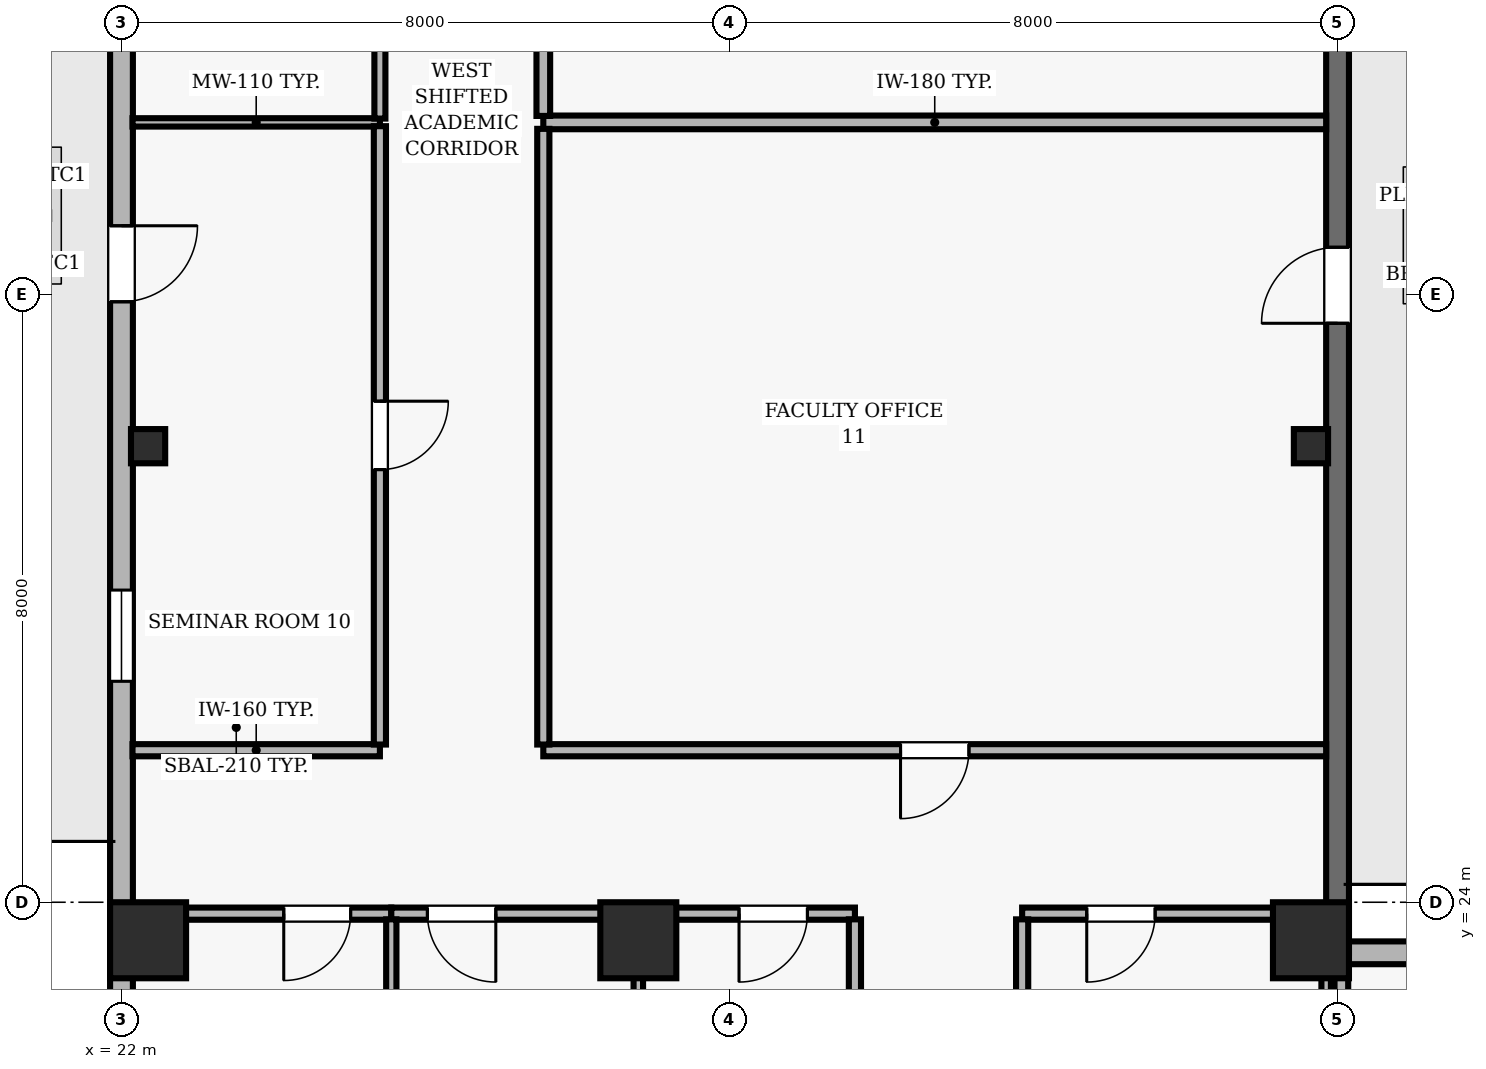
"""IFC4 building model, lengths in metres.
Left out: names, types, materials, properties, quantities, classifications, styles, units other than length and angle.
Written with IfcOpenShell. Run it as: python <this file> out.ifc"""

import sys

from ifc_helpers import new_model, si_unit, direction, frame, frame_2d, origin, origin_2d, place, context, subcontext, project, spatial, rectangle, hollow_rectangle, extrude, element, fill, save


model = new_model("IFC4")
c1 = context("Model", 3, precision=1e-05, world=origin(), true_north=direction((0.0, 1.0)))
c2 = subcontext(c1, "Body", "Model", "MODEL_VIEW")
j1 = project(units=[si_unit("LENGTHUNIT", "METRE"), si_unit("PLANEANGLEUNIT", "RADIAN")], contexts=[c1])
p1 = place(None, origin())
s1 = spatial("IfcSite", under=j1, at=p1, CompositionType="ELEMENT")
p2 = place(p1, origin())
s2 = spatial("IfcBuilding", under=s1, at=p2, CompositionType="ELEMENT")
p3 = place(p2, frame((0.0, 0.0, 199.2)))
s3 = spatial("IfcBuildingStorey", under=s2, at=p3, CompositionType="ELEMENT", Elevation=199.2)
for number, where, z_axis, x_axis in (
    (1, (22.35, 23.5, 0.0), (0.0, 0.0, 1.0), (1.0, 0.0, 0.0)),
    (2, (28.8, 23.5, 0.0), (0.0, 0.0, 1.0), (1.0, 0.0, 0.0)),
    (3, (37.65, 23.5, 0.0), (0.0, 0.0, 1.0), (1.0, 0.0, 0.0)),
):
    element("IfcColumn", number, at=place(p3, frame(where, z_axis=z_axis, x_axis=x_axis)), inside=s3, PredefinedType="COLUMN", context=c2, shape_type="SweptSolid", body=[
        extrude(rectangle(XDim=1.0, YDim=1.0, at=origin_2d()), origin(), (0.0, 0.0, 1.0), 3.9),
    ])
for number, where, z_axis, x_axis in (
    (4, (22.35, 30.0, 0.0), (0.0, 0.0, 1.0), (1.0, 0.0, 0.0)),
    (5, (37.65, 30.0, 0.0), (0.0, 0.0, 1.0), (1.0, 0.0, 0.0)),
):
    element("IfcColumn", number, at=place(p3, frame(where, z_axis=z_axis, x_axis=x_axis)), inside=s3, PredefinedType="COLUMN", context=c2, shape_type="SweptSolid", body=[
        extrude(hollow_rectangle(XDim=0.45, YDim=0.45, WallThickness=0.02, at=origin_2d()), origin(), (0.0, 0.0, 1.0), 3.9),
    ])
p4 = place(p3, frame((45.9, 23.335, 0.0), z_axis=(0.0, 0.0, 1.0), x_axis=(-1.0, 0.0, 0.0)))
e6 = element("IfcWall", 6, at=p4, inside=s3, PredefinedType="SOLIDWALL", context=c2, shape_type="SweptSolid", body=[
    extrude(rectangle(XDim=7.9, YDim=0.3, at=frame_2d((3.95, 0.0))), origin(), (0.0, 0.0, 1.0), 3.69),
])
p5 = place(p4, frame((2.75, 0.0, 0.9)))
e7 = element("IfcOpeningElement", 7, at=p5, cuts=e6, PredefinedType="OPENING", context=c2, shape_type="SweptSolid", body=[
    extrude(rectangle(XDim=2.4, YDim=1.8, at=frame_2d((1.2, 0.9))), frame((0.0, 0.16, 0.0), z_axis=(0.0, -1.0, 0.0), x_axis=(1.0, 0.0, 0.0)), (0.0, 0.0, 1.0), 0.32),
])
p6 = place(p3, frame((38.0, 23.335, 0.0), z_axis=(0.0, 0.0, 1.0), x_axis=(0.0, 1.0, 0.0)))
e8 = element("IfcWall", 8, at=p6, inside=s3, PredefinedType="SOLIDWALL", context=c2, shape_type="SweptSolid", body=[
    extrude(rectangle(XDim=17.365, YDim=0.3, at=frame_2d((8.683, 0.0))), origin(), (0.0, 0.0, 1.0), 3.69),
])
p7 = place(p6, frame((8.282, 0.0, 0.0)))
e9 = element("IfcOpeningElement", 9, at=p7, cuts=e8, PredefinedType="OPENING", context=c2, shape_type="SweptSolid", body=[
    extrude(rectangle(XDim=1.0, YDim=2.2, at=frame_2d((0.5, 1.1))), frame((0.0, 0.16, 0.0), z_axis=(0.0, -1.0, 0.0), x_axis=(1.0, 0.0, 0.0)), (0.0, 0.0, 1.0), 0.32),
])
p8 = place(p6, frame((13.071, 0.0, 0.9)))
e10 = element("IfcOpeningElement", 10, at=p8, cuts=e8, PredefinedType="OPENING", context=c2, shape_type="SweptSolid", body=[
    extrude(rectangle(XDim=2.8, YDim=1.8, at=frame_2d((1.4, 0.9))), frame((0.0, 0.16, 0.0), z_axis=(0.0, -1.0, 0.0), x_axis=(1.0, 0.0, 0.0)), (0.0, 0.0, 1.0), 0.32),
])
p9 = place(p3, frame((22.0, 40.7, 0.0), z_axis=(0.0, 0.0, 1.0), x_axis=(0.0, -1.0, 0.0)))
e11 = element("IfcWall", 11, at=p9, inside=s3, PredefinedType="SOLIDWALL", context=c2, shape_type="SweptSolid", body=[
    extrude(rectangle(XDim=38.2, YDim=0.3, at=frame_2d((19.1, 0.0))), origin(), (0.0, 0.0, 1.0), 3.69),
])
p10 = place(p9, frame((7.8, 0.0, 0.0)))
e12 = element("IfcOpeningElement", 12, at=p10, cuts=e11, PredefinedType="OPENING", context=c2, shape_type="SweptSolid", body=[
    extrude(rectangle(XDim=1.0, YDim=2.2, at=frame_2d((0.5, 1.1))), frame((0.0, 0.16, 0.0), z_axis=(0.0, -1.0, 0.0), x_axis=(1.0, 0.0, 0.0)), (0.0, 0.0, 1.0), 0.32),
])
p11 = place(p9, frame((2.129, 0.0, 0.9)))
e13 = element("IfcOpeningElement", 13, at=p11, cuts=e11, PredefinedType="OPENING", context=c2, shape_type="SweptSolid", body=[
    extrude(rectangle(XDim=1.2, YDim=1.6, at=frame_2d((0.6, 0.8))), frame((0.0, 0.16, 0.0), z_axis=(0.0, -1.0, 0.0), x_axis=(1.0, 0.0, 0.0)), (0.0, 0.0, 1.0), 0.32),
])
p12 = place(p9, frame((12.593, 0.0, 0.9)))
e14 = element("IfcOpeningElement", 14, at=p12, cuts=e11, PredefinedType="OPENING", context=c2, shape_type="SweptSolid", body=[
    extrude(rectangle(XDim=1.2, YDim=1.6, at=frame_2d((0.6, 0.8))), frame((0.0, 0.16, 0.0), z_axis=(0.0, -1.0, 0.0), x_axis=(1.0, 0.0, 0.0)), (0.0, 0.0, 1.0), 0.32),
])
p13 = place(p9, frame((18.5, 0.0, 0.9)))
e15 = element("IfcOpeningElement", 15, at=p13, cuts=e11, PredefinedType="OPENING", context=c2, shape_type="SweptSolid", body=[
    extrude(rectangle(XDim=1.2, YDim=1.6, at=frame_2d((0.6, 0.8))), frame((0.0, 0.16, 0.0), z_axis=(0.0, -1.0, 0.0), x_axis=(1.0, 0.0, 0.0)), (0.0, 0.0, 1.0), 0.32),
])
p14 = place(p9, frame((23.957, 0.0, 0.9)))
e16 = element("IfcOpeningElement", 16, at=p14, cuts=e11, PredefinedType="OPENING", context=c2, shape_type="SweptSolid", body=[
    extrude(rectangle(XDim=1.2, YDim=1.6, at=frame_2d((0.6, 0.8))), frame((0.0, 0.16, 0.0), z_axis=(0.0, -1.0, 0.0), x_axis=(1.0, 0.0, 0.0)), (0.0, 0.0, 1.0), 0.32),
])
p15 = place(p9, frame((29.414, 0.0, 0.9)))
e17 = element("IfcOpeningElement", 17, at=p15, cuts=e11, PredefinedType="OPENING", context=c2, shape_type="SweptSolid", body=[
    extrude(rectangle(XDim=1.2, YDim=1.6, at=frame_2d((0.6, 0.8))), frame((0.0, 0.16, 0.0), z_axis=(0.0, -1.0, 0.0), x_axis=(1.0, 0.0, 0.0)), (0.0, 0.0, 1.0), 0.32),
])
p16 = place(p3, frame((25.4, 26.0, 0.0), z_axis=(0.0, 0.0, 1.0), x_axis=(-1.0, 0.0, 0.0)))
e18 = element("IfcWall", 18, at=p16, inside=s3, PredefinedType="PARTITIONING", context=c2, shape_type="SweptSolid", body=[
    extrude(rectangle(XDim=3.255, YDim=0.16, at=frame_2d((1.627, 0.0))), origin(), (0.0, 0.0, 1.0), 3.69),
])
p17 = place(p3, frame((25.4, 34.26, 0.0), z_axis=(0.0, 0.0, 1.0), x_axis=(-1.0, 0.0, 0.0)))
e19 = element("IfcWall", 19, at=p17, inside=s3, PredefinedType="MOVABLE", context=c2, shape_type="SweptSolid", body=[
    extrude(rectangle(XDim=3.255, YDim=0.11, at=frame_2d((1.627, 0.0))), origin(), (0.0, 0.0, 1.0), 3.69),
])
p18 = place(p3, frame((25.55, 23.85, 0.0), z_axis=(0.0, 0.0, 1.0), x_axis=(-1.0, 0.0, 0.0)))
e20 = element("IfcWall", 20, at=p18, inside=s3, PredefinedType="PARTITIONING", context=c2, shape_type="SweptSolid", body=[
    extrude(rectangle(XDim=3.35, YDim=0.16, at=frame_2d((1.675, 0.0))), origin(), (0.0, 0.0, 1.0), 3.139),
])
p19 = place(p18, frame((0.535, 0.0, 0.0)))
e21 = element("IfcOpeningElement", 21, at=p19, cuts=e20, PredefinedType="OPENING", context=c2, shape_type="SweptSolid", body=[
    extrude(rectangle(XDim=0.88, YDim=2.1, at=frame_2d((0.44, 1.05))), frame((0.0, 0.09, 0.0), z_axis=(0.0, -1.0, 0.0), x_axis=(1.0, 0.0, 0.0)), (0.0, 0.0, 1.0), 0.18),
])
p20 = place(p3, frame((28.8, 23.85, 0.0), z_axis=(0.0, 0.0, 1.0), x_axis=(-1.0, 0.0, 0.0)))
e22 = element("IfcWall", 22, at=p20, inside=s3, PredefinedType="PARTITIONING", context=c2, shape_type="SweptSolid", body=[
    extrude(rectangle(XDim=3.25, YDim=0.16, at=frame_2d((1.625, 0.0))), origin(), (0.0, 0.0, 1.0), 3.139),
])
p21 = place(p20, frame((1.875, 0.0, 0.0)))
e23 = element("IfcOpeningElement", 23, at=p21, cuts=e22, PredefinedType="OPENING", context=c2, shape_type="SweptSolid", body=[
    extrude(rectangle(XDim=0.9, YDim=2.1, at=frame_2d((0.45, 1.05))), frame((0.0, 0.09, 0.0), z_axis=(0.0, -1.0, 0.0), x_axis=(1.0, 0.0, 0.0)), (0.0, 0.0, 1.0), 0.18),
])
p22 = place(p3, frame((31.65, 23.85, 0.0), z_axis=(0.0, 0.0, 1.0), x_axis=(-1.0, 0.0, 0.0)))
e24 = element("IfcWall", 24, at=p22, inside=s3, PredefinedType="PARTITIONING", context=c2, shape_type="SweptSolid", body=[
    extrude(rectangle(XDim=2.85, YDim=0.16, at=frame_2d((1.425, 0.0))), origin(), (0.0, 0.0, 1.0), 3.139),
])
p23 = place(p22, frame((0.625, 0.0, 0.0)))
e25 = element("IfcOpeningElement", 25, at=p23, cuts=e24, PredefinedType="OPENING", context=c2, shape_type="SweptSolid", body=[
    extrude(rectangle(XDim=0.9, YDim=2.1, at=frame_2d((0.45, 1.05))), frame((0.0, 0.09, 0.0), z_axis=(0.0, -1.0, 0.0), x_axis=(1.0, 0.0, 0.0)), (0.0, 0.0, 1.0), 0.18),
])
p24 = place(p3, frame((37.85, 23.85, 0.0), z_axis=(0.0, 0.0, 1.0), x_axis=(-1.0, 0.0, 0.0)))
e26 = element("IfcWall", 26, at=p24, inside=s3, PredefinedType="PARTITIONING", context=c2, shape_type="SweptSolid", body=[
    extrude(rectangle(XDim=4.0, YDim=0.16, at=frame_2d((2.0, 0.0))), origin(), (0.0, 0.0, 1.0), 3.139),
])
p25 = place(p24, frame((2.25, 0.0, 0.0)))
e27 = element("IfcOpeningElement", 27, at=p25, cuts=e26, PredefinedType="OPENING", context=c2, shape_type="SweptSolid", body=[
    extrude(rectangle(XDim=0.9, YDim=2.1, at=frame_2d((0.45, 1.05))), frame((0.0, 0.09, 0.0), z_axis=(0.0, -1.0, 0.0), x_axis=(1.0, 0.0, 0.0)), (0.0, 0.0, 1.0), 0.18),
])
p26 = place(p3, frame((37.85, 26.0, 0.0), z_axis=(0.0, 0.0, 1.0), x_axis=(-1.0, 0.0, 0.0)))
e28 = element("IfcWall", 28, at=p26, inside=s3, PredefinedType="PARTITIONING", context=c2, shape_type="SweptSolid", body=[
    extrude(rectangle(XDim=10.3, YDim=0.16, at=frame_2d((5.15, 0.0))), origin(), (0.0, 0.0, 1.0), 3.69),
])
p27 = place(p26, frame((4.7, 0.0, 0.0)))
e29 = element("IfcOpeningElement", 29, at=p27, cuts=e28, PredefinedType="OPENING", context=c2, shape_type="SweptSolid", body=[
    extrude(rectangle(XDim=0.9, YDim=2.1, at=frame_2d((0.45, 1.05))), frame((0.0, 0.09, 0.0), z_axis=(0.0, -1.0, 0.0), x_axis=(1.0, 0.0, 0.0)), (0.0, 0.0, 1.0), 0.18),
])
p28 = place(p3, frame((37.85, 34.26, 0.0), z_axis=(0.0, 0.0, 1.0), x_axis=(-1.0, 0.0, 0.0)))
e30 = element("IfcWall", 30, at=p28, inside=s3, PredefinedType="PARTITIONING", context=c2, shape_type="SweptSolid", body=[
    extrude(rectangle(XDim=10.3, YDim=0.18, at=frame_2d((5.15, 0.0))), origin(), (0.0, 0.0, 1.0), 3.69),
])
p29 = place(p3, frame((25.4, 34.21, 0.0), z_axis=(0.0, 0.0, 1.0), x_axis=(0.0, -1.0, 0.0)))
e31 = element("IfcWall", 31, at=p29, inside=s3, PredefinedType="PARTITIONING", context=c2, shape_type="SweptSolid", body=[
    extrude(rectangle(XDim=8.135, YDim=0.16, at=frame_2d((4.067, 0.0))), origin(), (0.0, 0.0, 1.0), 3.69),
])
p30 = place(p29, frame((3.618, 0.0, 0.0)))
e32 = element("IfcOpeningElement", 32, at=p30, cuts=e31, PredefinedType="OPENING", context=c2, shape_type="SweptSolid", body=[
    extrude(rectangle(XDim=0.9, YDim=2.1, at=frame_2d((0.45, 1.05))), frame((0.0, 0.09, 0.0), z_axis=(0.0, -1.0, 0.0), x_axis=(1.0, 0.0, 0.0)), (0.0, 0.0, 1.0), 0.18),
])
p31 = place(p3, frame((25.4, 43.055, 0.0), z_axis=(0.0, 0.0, 1.0), x_axis=(0.0, -1.0, 0.0)))
e33 = element("IfcWall", 33, at=p31, inside=s3, PredefinedType="PARTITIONING", context=c2, shape_type="SweptSolid", body=[
    extrude(rectangle(XDim=8.745, YDim=0.145, at=frame_2d((4.373, 0.0))), origin(), (0.0, 0.0, 1.0), 3.69),
])
p32 = place(p31, frame((3.822, 0.0, 0.0)))
e34 = element("IfcOpeningElement", 34, at=p32, cuts=e33, PredefinedType="OPENING", context=c2, shape_type="SweptSolid", body=[
    extrude(rectangle(XDim=1.1, YDim=2.15, at=frame_2d((0.55, 1.075))), frame((0.0, 0.083, 0.0), z_axis=(0.0, -1.0, 0.0), x_axis=(1.0, 0.0, 0.0)), (0.0, 0.0, 1.0), 0.165),
])
p33 = place(p3, frame((25.55, 19.16, 0.0), z_axis=(0.0, 0.0, 1.0), x_axis=(0.0, 1.0, 0.0)))
e35 = element("IfcWall", 35, at=p33, inside=s3, PredefinedType="PARTITIONING", context=c2, shape_type="SweptSolid", body=[
    extrude(rectangle(XDim=4.615, YDim=0.135, at=frame_2d((2.308, 0.0))), origin(), (0.0, 0.0, 1.0), 3.69),
])
p34 = place(p3, frame((27.55, 26.075, 0.0), z_axis=(0.0, 0.0, 1.0), x_axis=(0.0, 1.0, 0.0)))
e36 = element("IfcWall", 36, at=p34, inside=s3, PredefinedType="PARTITIONING", context=c2, shape_type="SweptSolid", body=[
    extrude(rectangle(XDim=8.1, YDim=0.16, at=frame_2d((4.05, 0.0))), origin(), (0.0, 0.0, 1.0), 3.69),
])
p35 = place(p3, frame((27.55, 34.345, 0.0), z_axis=(0.0, 0.0, 1.0), x_axis=(0.0, 1.0, 0.0)))
e37 = element("IfcWall", 37, at=p35, inside=s3, PredefinedType="PARTITIONING", context=c2, shape_type="SweptSolid", body=[
    extrude(rectangle(XDim=8.71, YDim=0.18, at=frame_2d((4.355, 0.0))), origin(), (0.0, 0.0, 1.0), 3.69),
])
p36 = place(p35, frame((3.88, 0.0, 0.0)))
e38 = element("IfcOpeningElement", 38, at=p36, cuts=e37, PredefinedType="OPENING", context=c2, shape_type="SweptSolid", body=[
    extrude(rectangle(XDim=0.95, YDim=2.1, at=frame_2d((0.475, 1.05))), frame((0.0, 0.1, 0.0), z_axis=(0.0, -1.0, 0.0), x_axis=(1.0, 0.0, 0.0)), (0.0, 0.0, 1.0), 0.2),
])
p37 = place(p3, frame((28.8, 23.775, 0.0), z_axis=(0.0, 0.0, 1.0), x_axis=(0.0, -1.0, 0.0)))
e39 = element("IfcWall", 39, at=p37, inside=s3, PredefinedType="PARTITIONING", context=c2, shape_type="SweptSolid", body=[
    extrude(rectangle(XDim=2.267, YDim=0.125, at=frame_2d((1.133, 0.0))), origin(), (0.0, 0.0, 1.0), 3.69),
])
p38 = place(p3, frame((31.65, 23.775, 0.0), z_axis=(0.0, 0.0, 1.0), x_axis=(0.0, -1.0, 0.0)))
e40 = element("IfcWall", 40, at=p38, inside=s3, PredefinedType="PARTITIONING", context=c2, shape_type="SweptSolid", body=[
    extrude(rectangle(XDim=2.267, YDim=0.16, at=frame_2d((1.133, 0.0))), origin(), (0.0, 0.0, 1.0), 3.69),
])
p39 = place(p3, frame((33.85, 20.835, 0.0), z_axis=(0.0, 0.0, 1.0), x_axis=(0.0, 1.0, 0.0)))
e41 = element("IfcWall", 41, at=p39, inside=s3, PredefinedType="PARTITIONING", context=c2, shape_type="SweptSolid", body=[
    extrude(rectangle(XDim=2.94, YDim=0.16, at=frame_2d((1.47, 0.0))), origin(), (0.0, 0.0, 1.0), 3.69),
])
p40 = place(p3, frame((37.85, 20.835, 0.0), z_axis=(0.0, 0.0, 1.0), x_axis=(0.0, 1.0, 0.0)))
e42 = element("IfcWall", 42, at=p40, inside=s3, PredefinedType="PARTITIONING", context=c2, shape_type="SweptSolid", body=[
    extrude(rectangle(XDim=2.5, YDim=0.125, at=frame_2d((1.25, 0.0))), origin(), (0.0, 0.0, 1.0), 3.139),
])
p41 = place(p3, frame((38.05, 23.19, 0.0), z_axis=(0.0, 0.0, 1.0), x_axis=(0.0, -1.0, 0.0)))
e43 = element("IfcWall", 43, at=p41, inside=s3, PredefinedType="PARTITIONING", context=c2, shape_type="SweptSolid", body=[
    extrude(rectangle(XDim=7.115, YDim=0.18, at=frame_2d((3.558, 0.0))), origin(), (0.0, 0.0, 1.0), 3.139),
])
p42 = place(p7, origin())
e44 = element("IfcDoor", 44, at=p42, inside=s3, OperationType="SINGLE_SWING_LEFT", PredefinedType="DOOR", context=c2, shape_type="SweptSolid", body=[
    extrude(rectangle(XDim=1.0, YDim=2.2, at=frame_2d((0.5, 1.1))), frame((0.0, 0.025, 0.0), z_axis=(0.0, -1.0, 0.0), x_axis=(1.0, 0.0, 0.0)), (0.0, 0.0, 1.0), 0.05),
])
fill(e9, e44)
p43 = place(p10, origin())
e45 = element("IfcDoor", 45, at=p43, inside=s3, OperationType="SINGLE_SWING_LEFT", PredefinedType="DOOR", context=c2, shape_type="SweptSolid", body=[
    extrude(rectangle(XDim=1.0, YDim=2.2, at=frame_2d((0.5, 1.1))), frame((0.0, 0.025, 0.0), z_axis=(0.0, -1.0, 0.0), x_axis=(1.0, 0.0, 0.0)), (0.0, 0.0, 1.0), 0.05),
])
fill(e12, e45)
p44 = place(p12, origin())
e46 = element("IfcWindow", 46, at=p44, inside=s3, PartitioningType="SINGLE_PANEL", PredefinedType="WINDOW", context=c2, shape_type="SweptSolid", body=[
    extrude(rectangle(XDim=1.2, YDim=1.6, at=frame_2d((0.6, 0.8))), frame((0.0, 0.03, 0.0), z_axis=(0.0, -1.0, 0.0), x_axis=(1.0, 0.0, 0.0)), (0.0, 0.0, 1.0), 0.06),
])
fill(e14, e46)
p45 = place(p25, origin())
e47 = element("IfcDoor", 47, at=p45, inside=s3, OperationType="SINGLE_SWING_RIGHT", PredefinedType="DOOR", context=c2, shape_type="SweptSolid", body=[
    extrude(rectangle(XDim=0.9, YDim=2.1, at=frame_2d((0.45, 1.05))), frame((0.0, 0.025, 0.0), z_axis=(0.0, -1.0, 0.0), x_axis=(1.0, 0.0, 0.0)), (0.0, 0.0, 1.0), 0.05),
])
fill(e27, e47)
p46 = place(p23, origin())
e48 = element("IfcDoor", 48, at=p46, inside=s3, OperationType="SINGLE_SWING_RIGHT", PredefinedType="DOOR", context=c2, shape_type="SweptSolid", body=[
    extrude(rectangle(XDim=0.9, YDim=2.1, at=frame_2d((0.45, 1.05))), frame((0.0, 0.025, 0.0), z_axis=(0.0, -1.0, 0.0), x_axis=(1.0, 0.0, 0.0)), (0.0, 0.0, 1.0), 0.05),
])
fill(e25, e48)
p47 = place(p19, origin())
e49 = element("IfcDoor", 49, at=p47, inside=s3, OperationType="SINGLE_SWING_RIGHT", PredefinedType="DOOR", context=c2, shape_type="SweptSolid", body=[
    extrude(rectangle(XDim=0.88, YDim=2.1, at=frame_2d((0.44, 1.05))), frame((0.0, 0.025, 0.0), z_axis=(0.0, -1.0, 0.0), x_axis=(1.0, 0.0, 0.0)), (0.0, 0.0, 1.0), 0.05),
])
fill(e21, e49)
p48 = place(p21, origin())
e50 = element("IfcDoor", 50, at=p48, inside=s3, OperationType="SINGLE_SWING_LEFT", PredefinedType="DOOR", context=c2, shape_type="SweptSolid", body=[
    extrude(rectangle(XDim=0.9, YDim=2.1, at=frame_2d((0.45, 1.05))), frame((0.0, 0.025, 0.0), z_axis=(0.0, -1.0, 0.0), x_axis=(1.0, 0.0, 0.0)), (0.0, 0.0, 1.0), 0.05),
])
fill(e23, e50)
p49 = place(p30, origin())
e51 = element("IfcDoor", 51, at=p49, inside=s3, OperationType="SINGLE_SWING_LEFT", PredefinedType="DOOR", context=c2, shape_type="SweptSolid", body=[
    extrude(rectangle(XDim=0.9, YDim=2.1, at=frame_2d((0.45, 1.05))), frame((0.0, 0.025, 0.0), z_axis=(0.0, -1.0, 0.0), x_axis=(1.0, 0.0, 0.0)), (0.0, 0.0, 1.0), 0.05),
])
fill(e32, e51)
p50 = place(p27, origin())
e52 = element("IfcDoor", 52, at=p50, inside=s3, OperationType="SINGLE_SWING_RIGHT", PredefinedType="DOOR", context=c2, shape_type="SweptSolid", body=[
    extrude(rectangle(XDim=0.9, YDim=2.1, at=frame_2d((0.45, 1.05))), frame((0.0, 0.025, 0.0), z_axis=(0.0, -1.0, 0.0), x_axis=(1.0, 0.0, 0.0)), (0.0, 0.0, 1.0), 0.05),
])
fill(e29, e52)
save(model, sys.argv[1])
